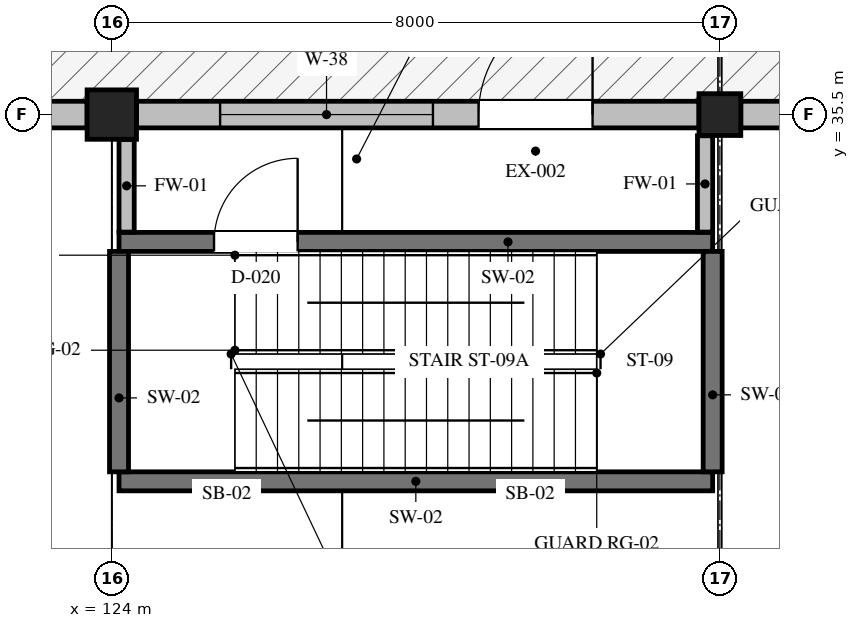
"""IFC4 building model, lengths in metres.
Left out: names, types, materials, properties, quantities, classifications, styles, units other than length and angle.
Written with IfcOpenShell. Run it as: python <this file> out.ifc"""

import sys

from ifc_helpers import new_model, si_unit, direction, frame, frame_2d, origin, origin_2d, place, context, subcontext, project, spatial, rectangle, hollow_rectangle, extrude, element, fill, save


model = new_model("IFC4")
c1 = context("Model", 3, precision=1e-05, world=origin(), true_north=direction((0.0, 1.0)))
c2 = subcontext(c1, "Body", "Model", "MODEL_VIEW")
j1 = project(units=[si_unit("LENGTHUNIT", "METRE"), si_unit("PLANEANGLEUNIT", "RADIAN")], contexts=[c1])
p1 = place(None, origin())
s1 = spatial("IfcSite", under=j1, at=p1, CompositionType="ELEMENT")
p2 = place(p1, origin())
s2 = spatial("IfcBuilding", under=s1, at=p2, CompositionType="ELEMENT")
p3 = place(p2, frame((0.0, 0.0, 0.45)))
s3 = spatial("IfcBuildingStorey", under=s2, at=p3, CompositionType="ELEMENT", Elevation=0.45)
p4 = place(p3, frame((124.0, 35.5, -0.45), z_axis=(0.0, 0.0, 1.0), x_axis=(1.0, 0.0, 0.0)))
e1 = element("IfcColumn", 1, at=p4, inside=s3, PredefinedType="COLUMN", context=c2, shape_type="SweptSolid", body=[
    extrude(hollow_rectangle(XDim=0.65, YDim=0.65, WallThickness=0.032, at=origin_2d()), origin(), (0.0, 0.0, 1.0), 5.85),
])
p5 = place(p3, frame((132.0, 35.5, -0.45), z_axis=(0.0, 0.0, 1.0), x_axis=(1.0, 0.0, 0.0)))
e2 = element("IfcColumn", 2, at=p5, inside=s3, PredefinedType="COLUMN", context=c2, shape_type="SweptSolid", body=[
    extrude(hollow_rectangle(XDim=0.55, YDim=0.55, WallThickness=0.026, at=origin_2d()), origin(), (0.0, 0.0, 1.0), 5.85),
])
p6 = place(p3, frame((115.775, 35.5, 0.0), z_axis=(0.0, 0.0, 1.0), x_axis=(1.0, 0.0, 0.0)))
e3 = element("IfcWall", 3, at=p6, inside=s3, PredefinedType="SOLIDWALL", context=c2, shape_type="SweptSolid", body=[
    extrude(rectangle(XDim=7.9, YDim=0.35, at=frame_2d((3.95, 0.0))), origin(), (0.0, 0.0, 1.0), 4.494),
])
p7 = place(p6, frame((1.85, 0.0, 0.0)))
e4 = element("IfcOpeningElement", 4, at=p7, cuts=e3, PredefinedType="OPENING", context=c2, shape_type="SweptSolid", body=[
    extrude(rectangle(XDim=4.2, YDim=4.344, at=frame_2d((2.1, 2.172))), frame((0.0, 0.185, 0.0), z_axis=(0.0, -1.0, 0.0), x_axis=(1.0, 0.0, 0.0)), (0.0, 0.0, 1.0), 0.37),
])
p8 = place(p3, frame((124.325, 35.5, 0.0), z_axis=(0.0, 0.0, 1.0), x_axis=(1.0, 0.0, 0.0)))
e5 = element("IfcWall", 5, at=p8, inside=s3, PredefinedType="SOLIDWALL", context=c2, shape_type="SweptSolid", body=[
    extrude(rectangle(XDim=7.4, YDim=0.35, at=frame_2d((3.7, 0.0))), origin(), (0.0, 0.0, 1.0), 4.606),
])
p9 = place(p8, frame((4.5, 0.0, 0.0)))
e6 = element("IfcOpeningElement", 6, at=p9, cuts=e5, PredefinedType="OPENING", context=c2, shape_type="SweptSolid", body=[
    extrude(rectangle(XDim=1.5, YDim=2.4, at=frame_2d((0.75, 1.2))), frame((0.0, 0.185, 0.0), z_axis=(0.0, -1.0, 0.0), x_axis=(1.0, 0.0, 0.0)), (0.0, 0.0, 1.0), 0.37),
])
p10 = place(p8, frame((1.1, 0.0, 1.8)))
e7 = element("IfcOpeningElement", 7, at=p10, cuts=e5, PredefinedType="OPENING", context=c2, shape_type="SweptSolid", body=[
    extrude(rectangle(XDim=2.8, YDim=1.2, at=frame_2d((1.4, 0.6))), frame((0.0, 0.185, 0.0), z_axis=(0.0, -1.0, 0.0), x_axis=(1.0, 0.0, 0.0)), (0.0, 0.0, 1.0), 0.37),
])
p11 = place(p3, frame((132.275, 35.5, 0.0), z_axis=(0.0, 0.0, 1.0), x_axis=(1.0, 0.0, 0.0)))
e8 = element("IfcWall", 8, at=p11, inside=s3, PredefinedType="SOLIDWALL", context=c2, shape_type="SweptSolid", body=[
    extrude(rectangle(XDim=7.45, YDim=0.35, at=frame_2d((3.725, 0.0))), origin(), (0.0, 0.0, 1.0), 4.394),
])
p12 = place(p11, frame((1.725, 0.0, 0.0)))
e9 = element("IfcOpeningElement", 9, at=p12, cuts=e8, PredefinedType="OPENING", context=c2, shape_type="SweptSolid", body=[
    extrude(rectangle(XDim=4.0, YDim=4.244, at=frame_2d((2.0, 2.122))), frame((0.0, 0.185, 0.0), z_axis=(0.0, -1.0, 0.0), x_axis=(1.0, 0.0, 0.0)), (0.0, 0.0, 1.0), 0.37),
])
p13 = place(p3, frame((124.095, 30.675, 0.0), z_axis=(0.0, 0.0, 1.0), x_axis=(1.0, 0.0, 0.0)))
e10 = element("IfcWall", 10, at=p13, inside=s3, PredefinedType="SHEAR", context=c2, shape_type="SweptSolid", body=[
    extrude(rectangle(XDim=7.81, YDim=0.25, at=frame_2d((3.905, 0.0))), origin(), (0.0, 0.0, 1.0), 5.2),
])
p14 = place(p3, frame((124.095, 33.825, 0.0), z_axis=(0.0, 0.0, 1.0), x_axis=(1.0, 0.0, 0.0)))
e11 = element("IfcWall", 11, at=p14, inside=s3, PredefinedType="SHEAR", context=c2, shape_type="SweptSolid", body=[
    extrude(rectangle(XDim=7.81, YDim=0.25, at=frame_2d((3.905, 0.0))), origin(), (0.0, 0.0, 1.0), 5.2),
])
p15 = place(p14, frame((1.25, 0.0, 0.0)))
e12 = element("IfcOpeningElement", 12, at=p15, cuts=e11, PredefinedType="OPENING", context=c2, shape_type="SweptSolid", body=[
    extrude(rectangle(XDim=1.1, YDim=2.15, at=frame_2d((0.55, 1.075))), frame((0.0, 0.135, 0.0), z_axis=(0.0, -1.0, 0.0), x_axis=(1.0, 0.0, 0.0)), (0.0, 0.0, 1.0), 0.27),
])
for number, where, z_axis, x_axis in (
    (13, (124.095, 30.8, 0.0), (0.0, 0.0, 1.0), (0.0, 1.0, 0.0)),
    (14, (131.905, 30.8, 0.0), (0.0, 0.0, 1.0), (0.0, 1.0, 0.0)),
):
    element("IfcWall", number, at=place(p3, frame(where, z_axis=z_axis, x_axis=x_axis)), inside=s3, PredefinedType="SHEAR", context=c2, shape_type="SweptSolid", body=[
        extrude(rectangle(XDim=2.9, YDim=0.25, at=frame_2d((1.45, 0.0))), origin(), (0.0, 0.0, 1.0), 5.2),
    ])
p16 = place(p3, frame((124.195, 33.954, 0.0), z_axis=(0.0, 0.0, 1.0), x_axis=(0.0, 1.0, 0.0)))
e15 = element("IfcWall", 15, at=p16, inside=s3, PredefinedType="PARTITIONING", context=c2, shape_type="SweptSolid", body=[
    extrude(rectangle(XDim=1.217, YDim=0.2, at=frame_2d((0.608, 0.0))), origin(), (0.0, 0.0, 1.0), 4.73),
])
p17 = place(p3, frame((131.805, 33.954, 0.0), z_axis=(0.0, 0.0, 1.0), x_axis=(0.0, 1.0, 0.0)))
e16 = element("IfcWall", 16, at=p17, inside=s3, PredefinedType="PARTITIONING", context=c2, shape_type="SweptSolid", body=[
    extrude(rectangle(XDim=1.267, YDim=0.2, at=frame_2d((0.633, 0.0))), origin(), (0.0, 0.0, 1.0), 4.73),
])
p18 = place(p9, origin())
e17 = element("IfcDoor", 17, at=p18, inside=s3, OperationType="SINGLE_SWING_RIGHT", PredefinedType="DOOR", context=c2, shape_type="SweptSolid", body=[
    extrude(rectangle(XDim=1.5, YDim=2.4, at=frame_2d((0.75, 1.2))), frame((0.0, 0.025, 0.0), z_axis=(0.0, -1.0, 0.0), x_axis=(1.0, 0.0, 0.0)), (0.0, 0.0, 1.0), 0.05),
])
fill(e6, e17)
p19 = place(p10, origin())
e18 = element("IfcWindow", 18, at=p19, inside=s3, PartitioningType="SINGLE_PANEL", PredefinedType="WINDOW", context=c2, shape_type="SweptSolid", body=[
    extrude(rectangle(XDim=2.8, YDim=1.2, at=frame_2d((1.4, 0.6))), frame((0.0, 0.03, 0.0), z_axis=(0.0, -1.0, 0.0), x_axis=(1.0, 0.0, 0.0)), (0.0, 0.0, 1.0), 0.06),
])
fill(e7, e18)
p20 = place(p15, origin())
e19 = element("IfcDoor", 19, at=p20, inside=s3, OperationType="SINGLE_SWING_RIGHT", PredefinedType="DOOR", context=c2, shape_type="SweptSolid", body=[
    extrude(rectangle(XDim=1.1, YDim=2.15, at=frame_2d((0.55, 1.075))), frame((0.0, 0.025, 0.0), z_axis=(0.0, -1.0, 0.0), x_axis=(1.0, 0.0, 0.0)), (0.0, 0.0, 1.0), 0.05),
])
fill(e12, e19)
save(model, sys.argv[1])
